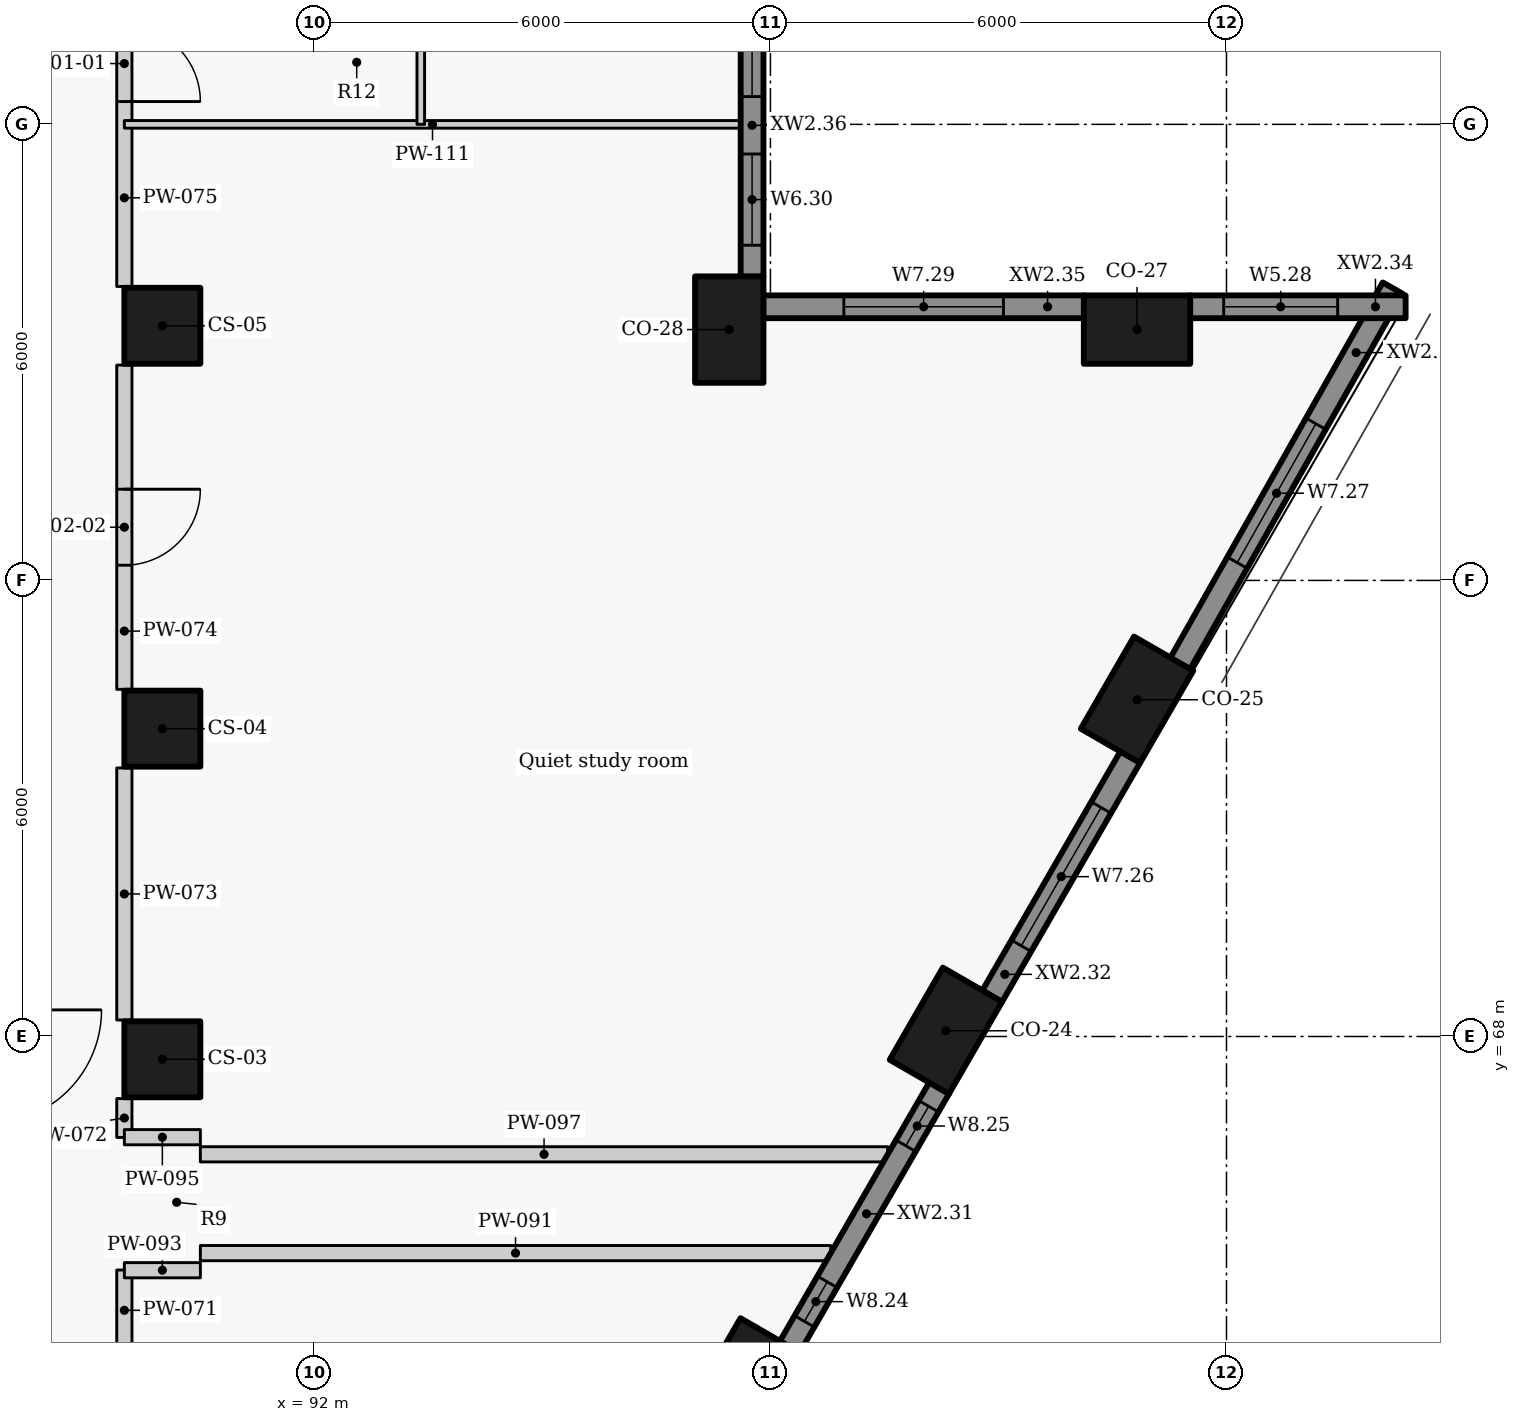
"""IFC4 building model, lengths in metres.
Left out: names, types, materials, properties, quantities, classifications, styles, units other than length and angle.
Written with IfcOpenShell. Run it as: python <this file> out.ifc"""

import sys

from ifc_helpers import new_model, si_unit, direction, frame, frame_2d, origin, origin_2d, place, context, subcontext, project, spatial, rectangle, extrude, element, fill, save


model = new_model("IFC4")
c1 = context("Model", 3, precision=1e-05, world=origin(), true_north=direction((0.0, 1.0)))
c2 = subcontext(c1, "Body", "Model", "MODEL_VIEW")
j1 = project(units=[si_unit("LENGTHUNIT", "METRE"), si_unit("PLANEANGLEUNIT", "RADIAN")], contexts=[c1])
p1 = place(None, origin())
s1 = spatial("IfcSite", under=j1, at=p1, CompositionType="ELEMENT")
p2 = place(p1, origin())
s2 = spatial("IfcBuilding", under=s1, at=p2, CompositionType="ELEMENT")
p3 = place(p2, frame((0.0, 0.0, 114.0)))
s3 = spatial("IfcBuildingStorey", under=s2, at=p3, CompositionType="ELEMENT", Elevation=114.0)
for number, where, z_axis, x_axis in (
    (1, (97.646, 63.463, 0.0), (0.0, 0.0, 1.0), (0.5, 0.866, 0.0)),
    (2, (100.308, 68.075, 0.0), (0.0, 0.0, 1.0), (0.5, 0.866, 0.0)),
    (3, (102.823, 72.43, 0.0), (0.0, 0.0, 1.0), (0.5, 0.866, 0.0)),
    (4, (102.823, 77.3, 0.0), (0.0, 0.0, 1.0), (-1.0, 0.0, 0.0)),
    (5, (97.458, 77.3, 0.0), (0.0, 0.0, 1.0), (0.0, 1.0, 0.0)),
):
    element("IfcColumn", number, at=place(p3, frame(where, z_axis=z_axis, x_axis=x_axis)), inside=s3, PredefinedType="COLUMN", context=c2, shape_type="SweptSolid", body=[
        extrude(rectangle(XDim=1.4, YDim=0.9, at=origin_2d()), origin(), (0.0, 0.0, 1.0), 3.3),
    ])
for number, where, z_axis, x_axis in (
    (6, (90.0, 67.7, 0.0), (0.0, 0.0, 1.0), (0.0, 1.0, 0.0)),
    (7, (90.0, 72.05, 0.0), (0.0, 0.0, 1.0), (0.0, 1.0, 0.0)),
    (8, (90.0, 77.35, 0.0), (0.0, 0.0, 1.0), (0.0, 1.0, 0.0)),
):
    element("IfcColumn", number, at=place(p3, frame(where, z_axis=z_axis, x_axis=x_axis)), inside=s3, PredefinedType="COLUMN", context=c2, shape_type="SweptSolid", body=[
        extrude(rectangle(XDim=1.0, YDim=1.0, at=origin_2d()), origin(), (0.0, 0.0, 1.0), 3.3),
    ])
p4 = place(p3, frame((98.253, 63.916, 0.0), z_axis=(0.0, 0.0, 1.0), x_axis=(0.499957037901, 0.866050206543, 0.0)))
e9 = element("IfcWall", 9, at=p4, inside=s3, PredefinedType="SOLIDWALL", context=c2, shape_type="SweptSolid", body=[
    extrude(rectangle(XDim=3.934, YDim=0.3, at=frame_2d((1.967, 0.0))), origin(), (0.0, 0.0, 1.0), 2.425),
])
p5 = place(p4, frame((0.389, 0.0, 0.9)))
e10 = element("IfcOpeningElement", 10, at=p5, cuts=e9, PredefinedType="OPENING", context=c2, shape_type="SweptSolid", body=[
    extrude(rectangle(XDim=0.6, YDim=1.1, at=frame_2d((0.3, 0.55))), frame((0.0, 0.16, 0.0), z_axis=(0.0, -1.0, 0.0), x_axis=(1.0, 0.0, 0.0)), (0.0, 0.0, 1.0), 0.32),
])
p6 = place(p4, frame((3.056, 0.0, 0.9)))
e11 = element("IfcOpeningElement", 11, at=p6, cuts=e9, PredefinedType="OPENING", context=c2, shape_type="SweptSolid", body=[
    extrude(rectangle(XDim=0.6, YDim=1.1, at=frame_2d((0.3, 0.55))), frame((0.0, 0.16, 0.0), z_axis=(0.0, -1.0, 0.0), x_axis=(1.0, 0.0, 0.0)), (0.0, 0.0, 1.0), 0.32),
])
p7 = place(p3, frame((100.916, 68.528, 0.0), z_axis=(0.0, 0.0, 1.0), x_axis=(0.500009139881, 0.866020126807, 0.0)))
e12 = element("IfcWall", 12, at=p7, inside=s3, PredefinedType="SOLIDWALL", context=c2, shape_type="SweptSolid", body=[
    extrude(rectangle(XDim=3.637, YDim=0.3, at=frame_2d((1.818, 0.0))), origin(), (0.0, 0.0, 1.0), 2.425),
])
p8 = place(p7, frame((0.768, 0.0, 0.9)))
e13 = element("IfcOpeningElement", 13, at=p8, cuts=e12, PredefinedType="OPENING", context=c2, shape_type="SweptSolid", body=[
    extrude(rectangle(XDim=2.1, YDim=1.1, at=frame_2d((1.05, 0.55))), frame((0.0, 0.16, 0.0), z_axis=(0.0, -1.0, 0.0), x_axis=(1.0, 0.0, 0.0)), (0.0, 0.0, 1.0), 0.32),
])
p9 = place(p3, frame((103.391, 72.906, 0.0), z_axis=(0.0, 0.0, 1.0), x_axis=(0.492456858874, 0.870336855561, 0.0)))
e14 = element("IfcWall", 14, at=p9, inside=s3, PredefinedType="SOLIDWALL", context=c2, shape_type="SweptSolid", body=[
    extrude(rectangle(XDim=5.677, YDim=0.3, at=frame_2d((2.838, 0.0))), origin(), (0.0, 0.0, 1.0), 2.425),
])
p10 = place(p9, frame((1.525, 0.0, 0.9)))
e15 = element("IfcOpeningElement", 15, at=p10, cuts=e14, PredefinedType="OPENING", context=c2, shape_type="SweptSolid", body=[
    extrude(rectangle(XDim=2.1, YDim=1.1, at=frame_2d((1.05, 0.55))), frame((0.0, 0.16, 0.0), z_axis=(0.0, -1.0, 0.0), x_axis=(1.0, 0.0, 0.0)), (0.0, 0.0, 1.0), 0.32),
])
p11 = place(p3, frame((106.357, 77.6, 0.0), z_axis=(0.0, 0.0, 1.0), x_axis=(-1.0, 0.0, 0.0)))
e16 = element("IfcWall", 16, at=p11, inside=s3, PredefinedType="SOLIDWALL", context=c2, shape_type="SweptSolid", body=[
    extrude(rectangle(XDim=2.838, YDim=0.3, at=frame_2d((1.419, 0.0))), origin(), (0.0, 0.0, 1.0), 2.425),
])
p12 = place(p11, frame((0.894, 0.0, 0.9)))
e17 = element("IfcOpeningElement", 17, at=p12, cuts=e16, PredefinedType="OPENING", context=c2, shape_type="SweptSolid", body=[
    extrude(rectangle(XDim=1.5, YDim=1.1, at=frame_2d((0.75, 0.55))), frame((0.0, 0.16, 0.0), z_axis=(0.0, -1.0, 0.0), x_axis=(1.0, 0.0, 0.0)), (0.0, 0.0, 1.0), 0.32),
])
p13 = place(p3, frame((102.127, 77.6, 0.0), z_axis=(0.0, 0.0, 1.0), x_axis=(-1.0, 0.0, 0.0)))
e18 = element("IfcWall", 18, at=p13, inside=s3, PredefinedType="SOLIDWALL", context=c2, shape_type="SweptSolid", body=[
    extrude(rectangle(XDim=4.223, YDim=0.3, at=frame_2d((2.111, 0.0))), origin(), (0.0, 0.0, 1.0), 2.425),
])
p14 = place(p13, frame((1.061, 0.0, 0.9)))
e19 = element("IfcOpeningElement", 19, at=p14, cuts=e18, PredefinedType="OPENING", context=c2, shape_type="SweptSolid", body=[
    extrude(rectangle(XDim=2.1, YDim=1.1, at=frame_2d((1.05, 0.55))), frame((0.0, 0.16, 0.0), z_axis=(0.0, -1.0, 0.0), x_axis=(1.0, 0.0, 0.0)), (0.0, 0.0, 1.0), 0.32),
])
p15 = place(p3, frame((97.758, 77.996, 0.0), z_axis=(0.0, 0.0, 1.0), x_axis=(0.0, 1.0, 0.0)))
e20 = element("IfcWall", 20, at=p15, inside=s3, PredefinedType="SOLIDWALL", context=c2, shape_type="SweptSolid", body=[
    extrude(rectangle(XDim=4.258, YDim=0.3, at=frame_2d((2.129, 0.0))), origin(), (0.0, 0.0, 1.0), 2.425),
])
p16 = place(p15, frame((0.414, 0.0, 0.9)))
e21 = element("IfcOpeningElement", 21, at=p16, cuts=e20, PredefinedType="OPENING", context=c2, shape_type="SweptSolid", body=[
    extrude(rectangle(XDim=1.2, YDim=1.1, at=frame_2d((0.6, 0.55))), frame((0.0, 0.16, 0.0), z_axis=(0.0, -1.0, 0.0), x_axis=(1.0, 0.0, 0.0)), (0.0, 0.0, 1.0), 0.32),
])
p17 = place(p15, frame((2.369, 0.0, 0.9)))
e22 = element("IfcOpeningElement", 22, at=p17, cuts=e20, PredefinedType="OPENING", context=c2, shape_type="SweptSolid", body=[
    extrude(rectangle(XDim=1.5, YDim=1.1, at=frame_2d((0.75, 0.55))), frame((0.0, 0.16, 0.0), z_axis=(0.0, -1.0, 0.0), x_axis=(1.0, 0.0, 0.0)), (0.0, 0.0, 1.0), 0.32),
])
p18 = place(p3, frame((89.5, 63.867, 0.0), z_axis=(0.0, 0.0, 1.0), x_axis=(0.0, 1.0, 0.0)))
e23 = element("IfcWall", 23, at=p18, inside=s3, PredefinedType="PARTITIONING", context=c2, shape_type="SweptSolid", body=[
    extrude(rectangle(XDim=1.061, YDim=0.2, at=frame_2d((0.531, 0.0))), origin(), (0.0, 0.0, 1.0), 3.025),
])
p19 = place(p3, frame((89.5, 66.672, 0.0), z_axis=(0.0, 0.0, 1.0), x_axis=(0.0, 1.0, 0.0)))
e24 = element("IfcWall", 24, at=p19, inside=s3, PredefinedType="PARTITIONING", context=c2, shape_type="SweptSolid", body=[
    extrude(rectangle(XDim=0.511, YDim=0.2, at=frame_2d((0.255, 0.0))), origin(), (0.0, 0.0, 1.0), 3.025),
])
p20 = place(p3, frame((89.5, 68.217, 0.0), z_axis=(0.0, 0.0, 1.0), x_axis=(0.0, 1.0, 0.0)))
e25 = element("IfcWall", 25, at=p20, inside=s3, PredefinedType="PARTITIONING", context=c2, shape_type="SweptSolid", body=[
    extrude(rectangle(XDim=3.316, YDim=0.2, at=frame_2d((1.658, 0.0))), origin(), (0.0, 0.0, 1.0), 3.025),
])
p21 = place(p3, frame((89.5, 76.833, 0.0), z_axis=(0.0, 0.0, 1.0), x_axis=(0.0, -1.0, 0.0)))
e26 = element("IfcWall", 26, at=p21, inside=s3, PredefinedType="PARTITIONING", context=c2, shape_type="SweptSolid", body=[
    extrude(rectangle(XDim=4.266, YDim=0.2, at=frame_2d((2.133, 0.0))), origin(), (0.0, 0.0, 1.0), 3.025),
])
p22 = place(p21, frame((1.633, 0.0, 0.0)))
e27 = element("IfcOpeningElement", 27, at=p22, cuts=e26, PredefinedType="OPENING", context=c2, shape_type="SweptSolid", body=[
    extrude(rectangle(XDim=1.0, YDim=2.1, at=frame_2d((0.5, 1.05))), frame((0.0, 0.11, 0.0), z_axis=(0.0, -1.0, 0.0), x_axis=(1.0, 0.0, 0.0)), (0.0, 0.0, 1.0), 0.22),
])
p23 = place(p3, frame((89.5, 82.133, 0.0), z_axis=(0.0, 0.0, 1.0), x_axis=(0.0, -1.0, 0.0)))
e28 = element("IfcWall", 28, at=p23, inside=s3, PredefinedType="PARTITIONING", context=c2, shape_type="SweptSolid", body=[
    extrude(rectangle(XDim=4.266, YDim=0.2, at=frame_2d((2.133, 0.0))), origin(), (0.0, 0.0, 1.0), 3.025),
])
p24 = place(p23, frame((0.833, 0.0, 0.0)))
e29 = element("IfcOpeningElement", 29, at=p24, cuts=e28, PredefinedType="OPENING", context=c2, shape_type="SweptSolid", body=[
    extrude(rectangle(XDim=1.0, YDim=2.1, at=frame_2d((0.5, 1.05))), frame((0.0, 0.11, 0.0), z_axis=(0.0, -1.0, 0.0), x_axis=(1.0, 0.0, 0.0)), (0.0, 0.0, 1.0), 0.22),
])
p25 = place(p3, frame((90.5, 65.15, 0.0), z_axis=(0.0, 0.0, 1.0), x_axis=(1.0, 0.0, 0.0)))
e30 = element("IfcWall", 30, at=p25, inside=s3, PredefinedType="PARTITIONING", context=c2, shape_type="SweptSolid", body=[
    extrude(rectangle(XDim=8.293, YDim=0.2, at=frame_2d((4.146, 0.0))), origin(), (0.0, 0.0, 1.0), 2.405),
])
for number, where, z_axis, x_axis in (
    (31, (89.5, 64.925, 0.0), (0.0, 0.0, 1.0), (1.0, 0.0, 0.0)),
    (32, (89.5, 66.675, 0.0), (0.0, 0.0, 1.0), (1.0, 0.0, 0.0)),
):
    element("IfcWall", number, at=place(p3, frame(where, z_axis=z_axis, x_axis=x_axis)), inside=s3, PredefinedType="PARTITIONING", context=c2, shape_type="SweptSolid", body=[
        extrude(rectangle(XDim=1.0, YDim=0.2, at=frame_2d((0.5, 0.0))), origin(), (0.0, 0.0, 1.0), 2.505),
    ])
p26 = place(p3, frame((90.5, 66.45, 0.0), z_axis=(0.0, 0.0, 1.0), x_axis=(1.0, 0.0, 0.0)))
e33 = element("IfcWall", 33, at=p26, inside=s3, PredefinedType="PARTITIONING", context=c2, shape_type="SweptSolid", body=[
    extrude(rectangle(XDim=9.043, YDim=0.2, at=frame_2d((4.521, 0.0))), origin(), (0.0, 0.0, 1.0), 2.405),
])
p27 = place(p3, frame((89.5, 80.0, 0.0), z_axis=(0.0, 0.0, 1.0), x_axis=(1.0, 0.0, 0.0)))
e34 = element("IfcWall", 34, at=p27, inside=s3, PredefinedType="PARTITIONING", context=c2, shape_type="SweptSolid", body=[
    extrude(rectangle(XDim=8.108, YDim=0.1, at=frame_2d((4.054, 0.0))), origin(), (0.0, 0.0, 1.0), 2.405),
])
p28 = place(p3, frame((93.4, 91.0, 0.0), z_axis=(0.0, 0.0, 1.0), x_axis=(0.0, -1.0, 0.0)))
e35 = element("IfcWall", 35, at=p28, inside=s3, PredefinedType="PARTITIONING", context=c2, shape_type="SweptSolid", body=[
    extrude(rectangle(XDim=11.0, YDim=0.1, at=frame_2d((5.5, 0.0))), origin(), (0.0, 0.0, 1.0), 3.025),
])
p29 = place(p28, frame((8.953, 0.0, 0.0)))
e36 = element("IfcOpeningElement", 36, at=p29, cuts=e35, PredefinedType="OPENING", context=c2, shape_type="SweptSolid", body=[
    extrude(rectangle(XDim=0.9, YDim=2.1, at=frame_2d((0.45, 1.05))), frame((0.0, 0.06, 0.0), z_axis=(0.0, -1.0, 0.0), x_axis=(1.0, 0.0, 0.0)), (0.0, 0.0, 1.0), 0.12),
])
p30 = place(p28, frame((5.76, 0.0, 0.0)))
e37 = element("IfcOpeningElement", 37, at=p30, cuts=e35, PredefinedType="OPENING", context=c2, shape_type="SweptSolid", body=[
    extrude(rectangle(XDim=0.9, YDim=2.1, at=frame_2d((0.45, 1.05))), frame((0.0, 0.06, 0.0), z_axis=(0.0, -1.0, 0.0), x_axis=(1.0, 0.0, 0.0)), (0.0, 0.0, 1.0), 0.12),
])
p31 = place(p28, frame((1.856, 0.0, 0.0)))
e38 = element("IfcOpeningElement", 38, at=p31, cuts=e35, PredefinedType="OPENING", context=c2, shape_type="SweptSolid", body=[
    extrude(rectangle(XDim=0.9, YDim=2.1, at=frame_2d((0.45, 1.05))), frame((0.0, 0.06, 0.0), z_axis=(0.0, -1.0, 0.0), x_axis=(1.0, 0.0, 0.0)), (0.0, 0.0, 1.0), 0.12),
])
p32 = place(p5, origin())
e39 = element("IfcWindow", 39, at=p32, inside=s3, PartitioningType="SINGLE_PANEL", PredefinedType="WINDOW", context=c2, shape_type="SweptSolid", body=[
    extrude(rectangle(XDim=0.6, YDim=1.1, at=frame_2d((0.3, 0.55))), frame((0.0, 0.03, 0.0), z_axis=(0.0, -1.0, 0.0), x_axis=(1.0, 0.0, 0.0)), (0.0, 0.0, 1.0), 0.06),
])
fill(e10, e39)
p33 = place(p6, origin())
e40 = element("IfcWindow", 40, at=p33, inside=s3, PartitioningType="SINGLE_PANEL", PredefinedType="WINDOW", context=c2, shape_type="SweptSolid", body=[
    extrude(rectangle(XDim=0.6, YDim=1.1, at=frame_2d((0.3, 0.55))), frame((0.0, 0.03, 0.0), z_axis=(0.0, -1.0, 0.0), x_axis=(1.0, 0.0, 0.0)), (0.0, 0.0, 1.0), 0.06),
])
fill(e11, e40)
p34 = place(p8, origin())
e41 = element("IfcWindow", 41, at=p34, inside=s3, PartitioningType="SINGLE_PANEL", PredefinedType="WINDOW", context=c2, shape_type="SweptSolid", body=[
    extrude(rectangle(XDim=2.1, YDim=1.1, at=frame_2d((1.05, 0.55))), frame((0.0, 0.03, 0.0), z_axis=(0.0, -1.0, 0.0), x_axis=(1.0, 0.0, 0.0)), (0.0, 0.0, 1.0), 0.06),
])
fill(e13, e41)
p35 = place(p10, origin())
e42 = element("IfcWindow", 42, at=p35, inside=s3, PartitioningType="SINGLE_PANEL", PredefinedType="WINDOW", context=c2, shape_type="SweptSolid", body=[
    extrude(rectangle(XDim=2.1, YDim=1.1, at=frame_2d((1.05, 0.55))), frame((0.0, 0.03, 0.0), z_axis=(0.0, -1.0, 0.0), x_axis=(1.0, 0.0, 0.0)), (0.0, 0.0, 1.0), 0.06),
])
fill(e15, e42)
p36 = place(p12, origin())
e43 = element("IfcWindow", 43, at=p36, inside=s3, PartitioningType="SINGLE_PANEL", PredefinedType="WINDOW", context=c2, shape_type="SweptSolid", body=[
    extrude(rectangle(XDim=1.5, YDim=1.1, at=frame_2d((0.75, 0.55))), frame((0.0, 0.03, 0.0), z_axis=(0.0, -1.0, 0.0), x_axis=(1.0, 0.0, 0.0)), (0.0, 0.0, 1.0), 0.06),
])
fill(e17, e43)
p37 = place(p14, origin())
e44 = element("IfcWindow", 44, at=p37, inside=s3, PartitioningType="SINGLE_PANEL", PredefinedType="WINDOW", context=c2, shape_type="SweptSolid", body=[
    extrude(rectangle(XDim=2.1, YDim=1.1, at=frame_2d((1.05, 0.55))), frame((0.0, 0.03, 0.0), z_axis=(0.0, -1.0, 0.0), x_axis=(1.0, 0.0, 0.0)), (0.0, 0.0, 1.0), 0.06),
])
fill(e19, e44)
p38 = place(p16, origin())
e45 = element("IfcWindow", 45, at=p38, inside=s3, PartitioningType="SINGLE_PANEL", PredefinedType="WINDOW", context=c2, shape_type="SweptSolid", body=[
    extrude(rectangle(XDim=1.2, YDim=1.1, at=frame_2d((0.6, 0.55))), frame((0.0, 0.03, 0.0), z_axis=(0.0, -1.0, 0.0), x_axis=(1.0, 0.0, 0.0)), (0.0, 0.0, 1.0), 0.06),
])
fill(e21, e45)
p39 = place(p17, origin())
e46 = element("IfcWindow", 46, at=p39, inside=s3, PartitioningType="SINGLE_PANEL", PredefinedType="WINDOW", context=c2, shape_type="SweptSolid", body=[
    extrude(rectangle(XDim=1.5, YDim=1.1, at=frame_2d((0.75, 0.55))), frame((0.0, 0.03, 0.0), z_axis=(0.0, -1.0, 0.0), x_axis=(1.0, 0.0, 0.0)), (0.0, 0.0, 1.0), 0.06),
])
fill(e22, e46)
p40 = place(p22, origin())
e47 = element("IfcDoor", 47, at=p40, inside=s3, OperationType="SINGLE_SWING_LEFT", PredefinedType="DOOR", context=c2, shape_type="SweptSolid", body=[
    extrude(rectangle(XDim=1.0, YDim=2.1, at=frame_2d((0.5, 1.05))), frame((0.0, 0.025, 0.0), z_axis=(0.0, -1.0, 0.0), x_axis=(1.0, 0.0, 0.0)), (0.0, 0.0, 1.0), 0.05),
])
fill(e27, e47)
p41 = place(p24, origin())
e48 = element("IfcDoor", 48, at=p41, inside=s3, OperationType="SINGLE_SWING_RIGHT", PredefinedType="DOOR", context=c2, shape_type="SweptSolid", body=[
    extrude(rectangle(XDim=1.0, YDim=2.1, at=frame_2d((0.5, 1.05))), frame((0.0, 0.025, 0.0), z_axis=(0.0, -1.0, 0.0), x_axis=(1.0, 0.0, 0.0)), (0.0, 0.0, 1.0), 0.05),
])
fill(e29, e48)
save(model, sys.argv[1])
